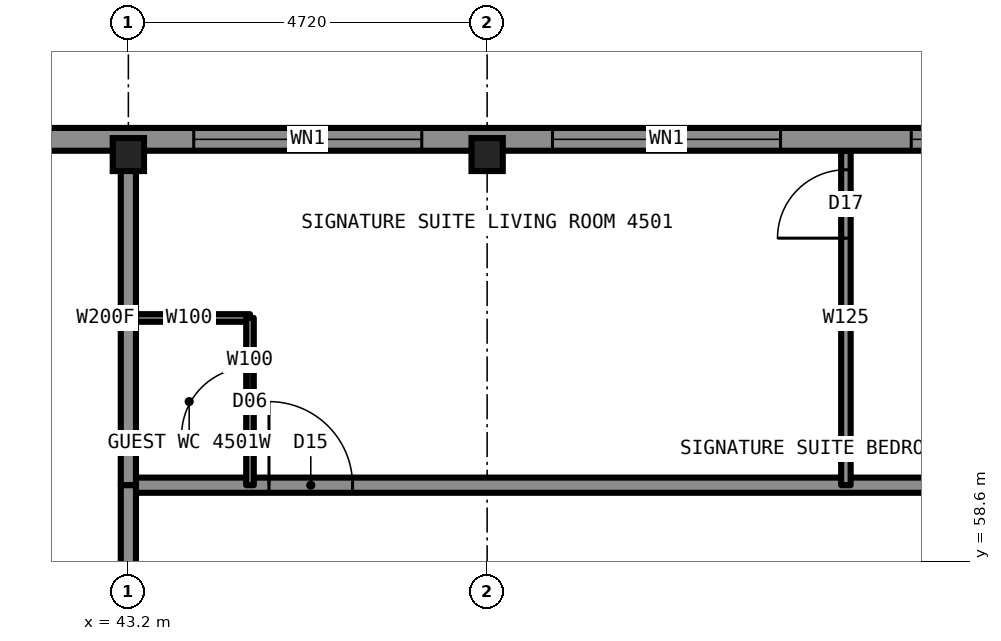
"""IFC4 building model, lengths in metres.
Left out: names, types, materials, properties, quantities, classifications, styles, units other than length and angle.
Written with IfcOpenShell. Run it as: python <this file> out.ifc"""

import sys

from ifc_helpers import new_model, si_unit, direction, frame, frame_2d, origin, origin_2d, place, context, subcontext, project, spatial, rectangle, i_section, extrude, element, fill, save


model = new_model("IFC4")
c1 = context("Model", 3, precision=1e-05, world=origin(), true_north=direction((0.0, 1.0)))
c2 = subcontext(c1, "Body", "Model", "MODEL_VIEW")
j1 = project(units=[si_unit("LENGTHUNIT", "METRE"), si_unit("PLANEANGLEUNIT", "RADIAN")], contexts=[c1])
p1 = place(None, origin())
s1 = spatial("IfcSite", under=j1, at=p1, CompositionType="ELEMENT")
p2 = place(p1, origin())
s2 = spatial("IfcBuilding", under=s1, at=p2, CompositionType="ELEMENT")
p3 = place(p2, frame((0.0, 0.0, 161.8)))
s3 = spatial("IfcBuildingStorey", under=s2, at=p3, CompositionType="ELEMENT", Elevation=161.8)
for number, where, z_axis, x_axis in (
    (1, (43.2, 63.95, 0.0), (0.0, 0.0, 1.0), (1.0, 0.0, 0.0)),
    (2, (47.92, 63.95, 0.0), (0.0, 0.0, 1.0), (1.0, 0.0, 0.0)),
):
    element("IfcColumn", number, at=place(p3, frame(where, z_axis=z_axis, x_axis=x_axis)), inside=s3, PredefinedType="COLUMN", context=c2, shape_type="SweptSolid", body=[
        extrude(i_section(OverallWidth=0.442, OverallDepth=0.531, WebThickness=0.066, FlangeThickness=0.106, at=origin_2d()), origin(), (0.0, 0.0, 1.0), 3.5),
    ])
p4 = place(p3, frame((43.2, 59.6, 0.0), z_axis=(0.0, 0.0, 1.0), x_axis=(1.0, 0.0, 0.0)))
e3 = element("IfcWall", 3, at=p4, inside=s3, PredefinedType="PARTITIONING", context=c2, shape_type="SweptSolid", body=[
    extrude(rectangle(XDim=23.6, YDim=0.2, at=frame_2d((11.8, 0.0))), origin(), (0.0, 0.0, 1.0), 3.33),
])
p5 = place(p4, frame((1.85, 0.0, 0.0)))
e4 = element("IfcOpeningElement", 4, at=p5, cuts=e3, PredefinedType="OPENING", context=c2, shape_type="SweptSolid", body=[
    extrude(rectangle(XDim=1.1, YDim=2.2, at=frame_2d((0.55, 1.1))), frame((0.0, 0.11, 0.0), z_axis=(0.0, -1.0, 0.0), x_axis=(1.0, 0.0, 0.0)), (0.0, 0.0, 1.0), 0.22),
])
p6 = place(p4, frame((17.16, 0.0, 0.0)))
e5 = element("IfcOpeningElement", 5, at=p6, cuts=e3, PredefinedType="OPENING", context=c2, shape_type="SweptSolid", body=[
    extrude(rectangle(XDim=1.0, YDim=2.2, at=frame_2d((0.5, 1.1))), frame((0.0, 0.11, 0.0), z_axis=(0.0, -1.0, 0.0), x_axis=(1.0, 0.0, 0.0)), (0.0, 0.0, 1.0), 0.22),
])
p7 = place(p3, frame((43.2, 61.8, 0.0), z_axis=(0.0, 0.0, 1.0), x_axis=(1.0, 0.0, 0.0)))
e6 = element("IfcWall", 6, at=p7, inside=s3, PredefinedType="PARTITIONING", context=c2, shape_type="SweptSolid", body=[
    extrude(rectangle(XDim=1.6, YDim=0.1, at=frame_2d((0.8, 0.0))), origin(), (0.0, 0.0, 1.0), 3.33),
])
p8 = place(p3, frame((44.8, 59.6, 0.0), z_axis=(0.0, 0.0, 1.0), x_axis=(0.0, 1.0, 0.0)))
e7 = element("IfcWall", 7, at=p8, inside=s3, PredefinedType="PARTITIONING", context=c2, shape_type="SweptSolid", body=[
    extrude(rectangle(XDim=2.2, YDim=0.1, at=frame_2d((1.1, 0.0))), origin(), (0.0, 0.0, 1.0), 3.33),
])
p9 = place(p8, frame((0.65, 0.0, 0.0)))
e8 = element("IfcOpeningElement", 8, at=p9, cuts=e7, PredefinedType="OPENING", context=c2, shape_type="SweptSolid", body=[
    extrude(rectangle(XDim=0.9, YDim=2.1, at=frame_2d((0.45, 1.05))), frame((0.0, 0.06, 0.0), z_axis=(0.0, -1.0, 0.0), x_axis=(1.0, 0.0, 0.0)), (0.0, 0.0, 1.0), 0.12),
])
p10 = place(p3, frame((43.2, 59.6, 0.0), z_axis=(0.0, 0.0, 1.0), x_axis=(0.0, 1.0, 0.0)))
e9 = element("IfcWall", 9, at=p10, inside=s3, PredefinedType="PARTITIONING", context=c2, shape_type="SweptSolid", body=[
    extrude(rectangle(XDim=4.4, YDim=0.2, at=frame_2d((2.2, 0.0))), origin(), (0.0, 0.0, 1.0), 2.573),
])
p11 = place(p3, frame((52.64, 59.6, 0.0), z_axis=(0.0, 0.0, 1.0), x_axis=(0.0, 1.0, 0.0)))
e10 = element("IfcWall", 10, at=p11, inside=s3, PredefinedType="PARTITIONING", context=c2, shape_type="SweptSolid", body=[
    extrude(rectangle(XDim=4.4, YDim=0.125, at=frame_2d((2.2, 0.0))), origin(), (0.0, 0.0, 1.0), 3.33),
])
p12 = place(p11, frame((3.25, 0.0, 0.0)))
e11 = element("IfcOpeningElement", 11, at=p12, cuts=e10, PredefinedType="OPENING", context=c2, shape_type="SweptSolid", body=[
    extrude(rectangle(XDim=0.9, YDim=2.2, at=frame_2d((0.45, 1.1))), frame((0.0, 0.073, 0.0), z_axis=(0.0, -1.0, 0.0), x_axis=(1.0, 0.0, 0.0)), (0.0, 0.0, 1.0), 0.145),
])
p13 = place(p3, frame((68.8, 64.15, 0.0), z_axis=(0.0, 0.0, 1.0), x_axis=(-1.0, 0.0, 0.0)))
e12 = element("IfcWall", 12, at=p13, inside=s3, PredefinedType="SOLIDWALL", context=c2, shape_type="SweptSolid", body=[
    extrude(rectangle(XDim=27.6, YDim=0.3, at=frame_2d((13.8, 0.0))), origin(), (0.0, 0.0, 1.0), 2.83),
])
p14 = place(p13, frame((2.86, 0.0, 0.3)))
e13 = element("IfcOpeningElement", 13, at=p14, cuts=e12, PredefinedType="OPENING", context=c2, shape_type="SweptSolid", body=[
    extrude(rectangle(XDim=3.0, YDim=2.0, at=frame_2d((1.5, 1.0))), frame((0.0, 0.16, 0.0), z_axis=(0.0, -1.0, 0.0), x_axis=(1.0, 0.0, 0.0)), (0.0, 0.0, 1.0), 0.32),
])
p15 = place(p13, frame((7.58, 0.0, 0.3)))
e14 = element("IfcOpeningElement", 14, at=p15, cuts=e12, PredefinedType="OPENING", context=c2, shape_type="SweptSolid", body=[
    extrude(rectangle(XDim=3.0, YDim=2.0, at=frame_2d((1.5, 1.0))), frame((0.0, 0.16, 0.0), z_axis=(0.0, -1.0, 0.0), x_axis=(1.0, 0.0, 0.0)), (0.0, 0.0, 1.0), 0.32),
])
p16 = place(p13, frame((12.3, 0.0, 0.3)))
e15 = element("IfcOpeningElement", 15, at=p16, cuts=e12, PredefinedType="OPENING", context=c2, shape_type="SweptSolid", body=[
    extrude(rectangle(XDim=3.0, YDim=2.0, at=frame_2d((1.5, 1.0))), frame((0.0, 0.16, 0.0), z_axis=(0.0, -1.0, 0.0), x_axis=(1.0, 0.0, 0.0)), (0.0, 0.0, 1.0), 0.32),
])
p17 = place(p13, frame((17.02, 0.0, 0.3)))
e16 = element("IfcOpeningElement", 16, at=p17, cuts=e12, PredefinedType="OPENING", context=c2, shape_type="SweptSolid", body=[
    extrude(rectangle(XDim=3.0, YDim=2.0, at=frame_2d((1.5, 1.0))), frame((0.0, 0.16, 0.0), z_axis=(0.0, -1.0, 0.0), x_axis=(1.0, 0.0, 0.0)), (0.0, 0.0, 1.0), 0.32),
])
p18 = place(p13, frame((21.74, 0.0, 0.3)))
e17 = element("IfcOpeningElement", 17, at=p18, cuts=e12, PredefinedType="OPENING", context=c2, shape_type="SweptSolid", body=[
    extrude(rectangle(XDim=3.0, YDim=2.0, at=frame_2d((1.5, 1.0))), frame((0.0, 0.16, 0.0), z_axis=(0.0, -1.0, 0.0), x_axis=(1.0, 0.0, 0.0)), (0.0, 0.0, 1.0), 0.32),
])
p19 = place(p3, frame((43.2, 56.78, 0.0), z_axis=(0.0, 0.0, 1.0), x_axis=(0.0, 1.0, 0.0)))
e18 = element("IfcWall", 18, at=p19, inside=s3, PredefinedType="PARTITIONING", context=c2, shape_type="SweptSolid", body=[
    extrude(rectangle(XDim=2.82, YDim=0.2, at=frame_2d((1.41, 0.0))), origin(), (0.0, 0.0, 1.0), 2.573),
])
p20 = place(p5, origin())
e19 = element("IfcDoor", 19, at=p20, inside=s3, OperationType="SINGLE_SWING_LEFT", PredefinedType="DOOR", context=c2, shape_type="SweptSolid", body=[
    extrude(rectangle(XDim=1.1, YDim=2.2, at=frame_2d((0.55, 1.1))), frame((0.0, 0.025, 0.0), z_axis=(0.0, -1.0, 0.0), x_axis=(1.0, 0.0, 0.0)), (0.0, 0.0, 1.0), 0.05),
])
fill(e4, e19)
p21 = place(p12, origin())
e20 = element("IfcDoor", 20, at=p21, inside=s3, OperationType="SINGLE_SWING_LEFT", PredefinedType="DOOR", context=c2, shape_type="SweptSolid", body=[
    extrude(rectangle(XDim=0.9, YDim=2.2, at=frame_2d((0.45, 1.1))), frame((0.0, 0.025, 0.0), z_axis=(0.0, -1.0, 0.0), x_axis=(1.0, 0.0, 0.0)), (0.0, 0.0, 1.0), 0.05),
])
fill(e11, e20)
p22 = place(p9, origin())
e21 = element("IfcDoor", 21, at=p22, inside=s3, OperationType="SINGLE_SWING_LEFT", PredefinedType="DOOR", context=c2, shape_type="SweptSolid", body=[
    extrude(rectangle(XDim=0.9, YDim=2.1, at=frame_2d((0.45, 1.05))), frame((0.0, 0.025, 0.0), z_axis=(0.0, -1.0, 0.0), x_axis=(1.0, 0.0, 0.0)), (0.0, 0.0, 1.0), 0.05),
])
fill(e8, e21)
p23 = place(p16, origin())
e22 = element("IfcWindow", 22, at=p23, inside=s3, PartitioningType="SINGLE_PANEL", PredefinedType="WINDOW", context=c2, shape_type="SweptSolid", body=[
    extrude(rectangle(XDim=3.0, YDim=2.0, at=frame_2d((1.5, 1.0))), frame((0.0, 0.13, 0.0), z_axis=(0.0, -1.0, 0.0), x_axis=(1.0, 0.0, 0.0)), (0.0, 0.0, 1.0), 0.06),
])
fill(e15, e22)
p24 = place(p17, origin())
e23 = element("IfcWindow", 23, at=p24, inside=s3, PartitioningType="SINGLE_PANEL", PredefinedType="WINDOW", context=c2, shape_type="SweptSolid", body=[
    extrude(rectangle(XDim=3.0, YDim=2.0, at=frame_2d((1.5, 1.0))), frame((0.0, 0.13, 0.0), z_axis=(0.0, -1.0, 0.0), x_axis=(1.0, 0.0, 0.0)), (0.0, 0.0, 1.0), 0.06),
])
fill(e16, e23)
p25 = place(p18, origin())
e24 = element("IfcWindow", 24, at=p25, inside=s3, PartitioningType="SINGLE_PANEL", PredefinedType="WINDOW", context=c2, shape_type="SweptSolid", body=[
    extrude(rectangle(XDim=3.0, YDim=2.0, at=frame_2d((1.5, 1.0))), frame((0.0, 0.13, 0.0), z_axis=(0.0, -1.0, 0.0), x_axis=(1.0, 0.0, 0.0)), (0.0, 0.0, 1.0), 0.06),
])
fill(e17, e24)
save(model, sys.argv[1])
